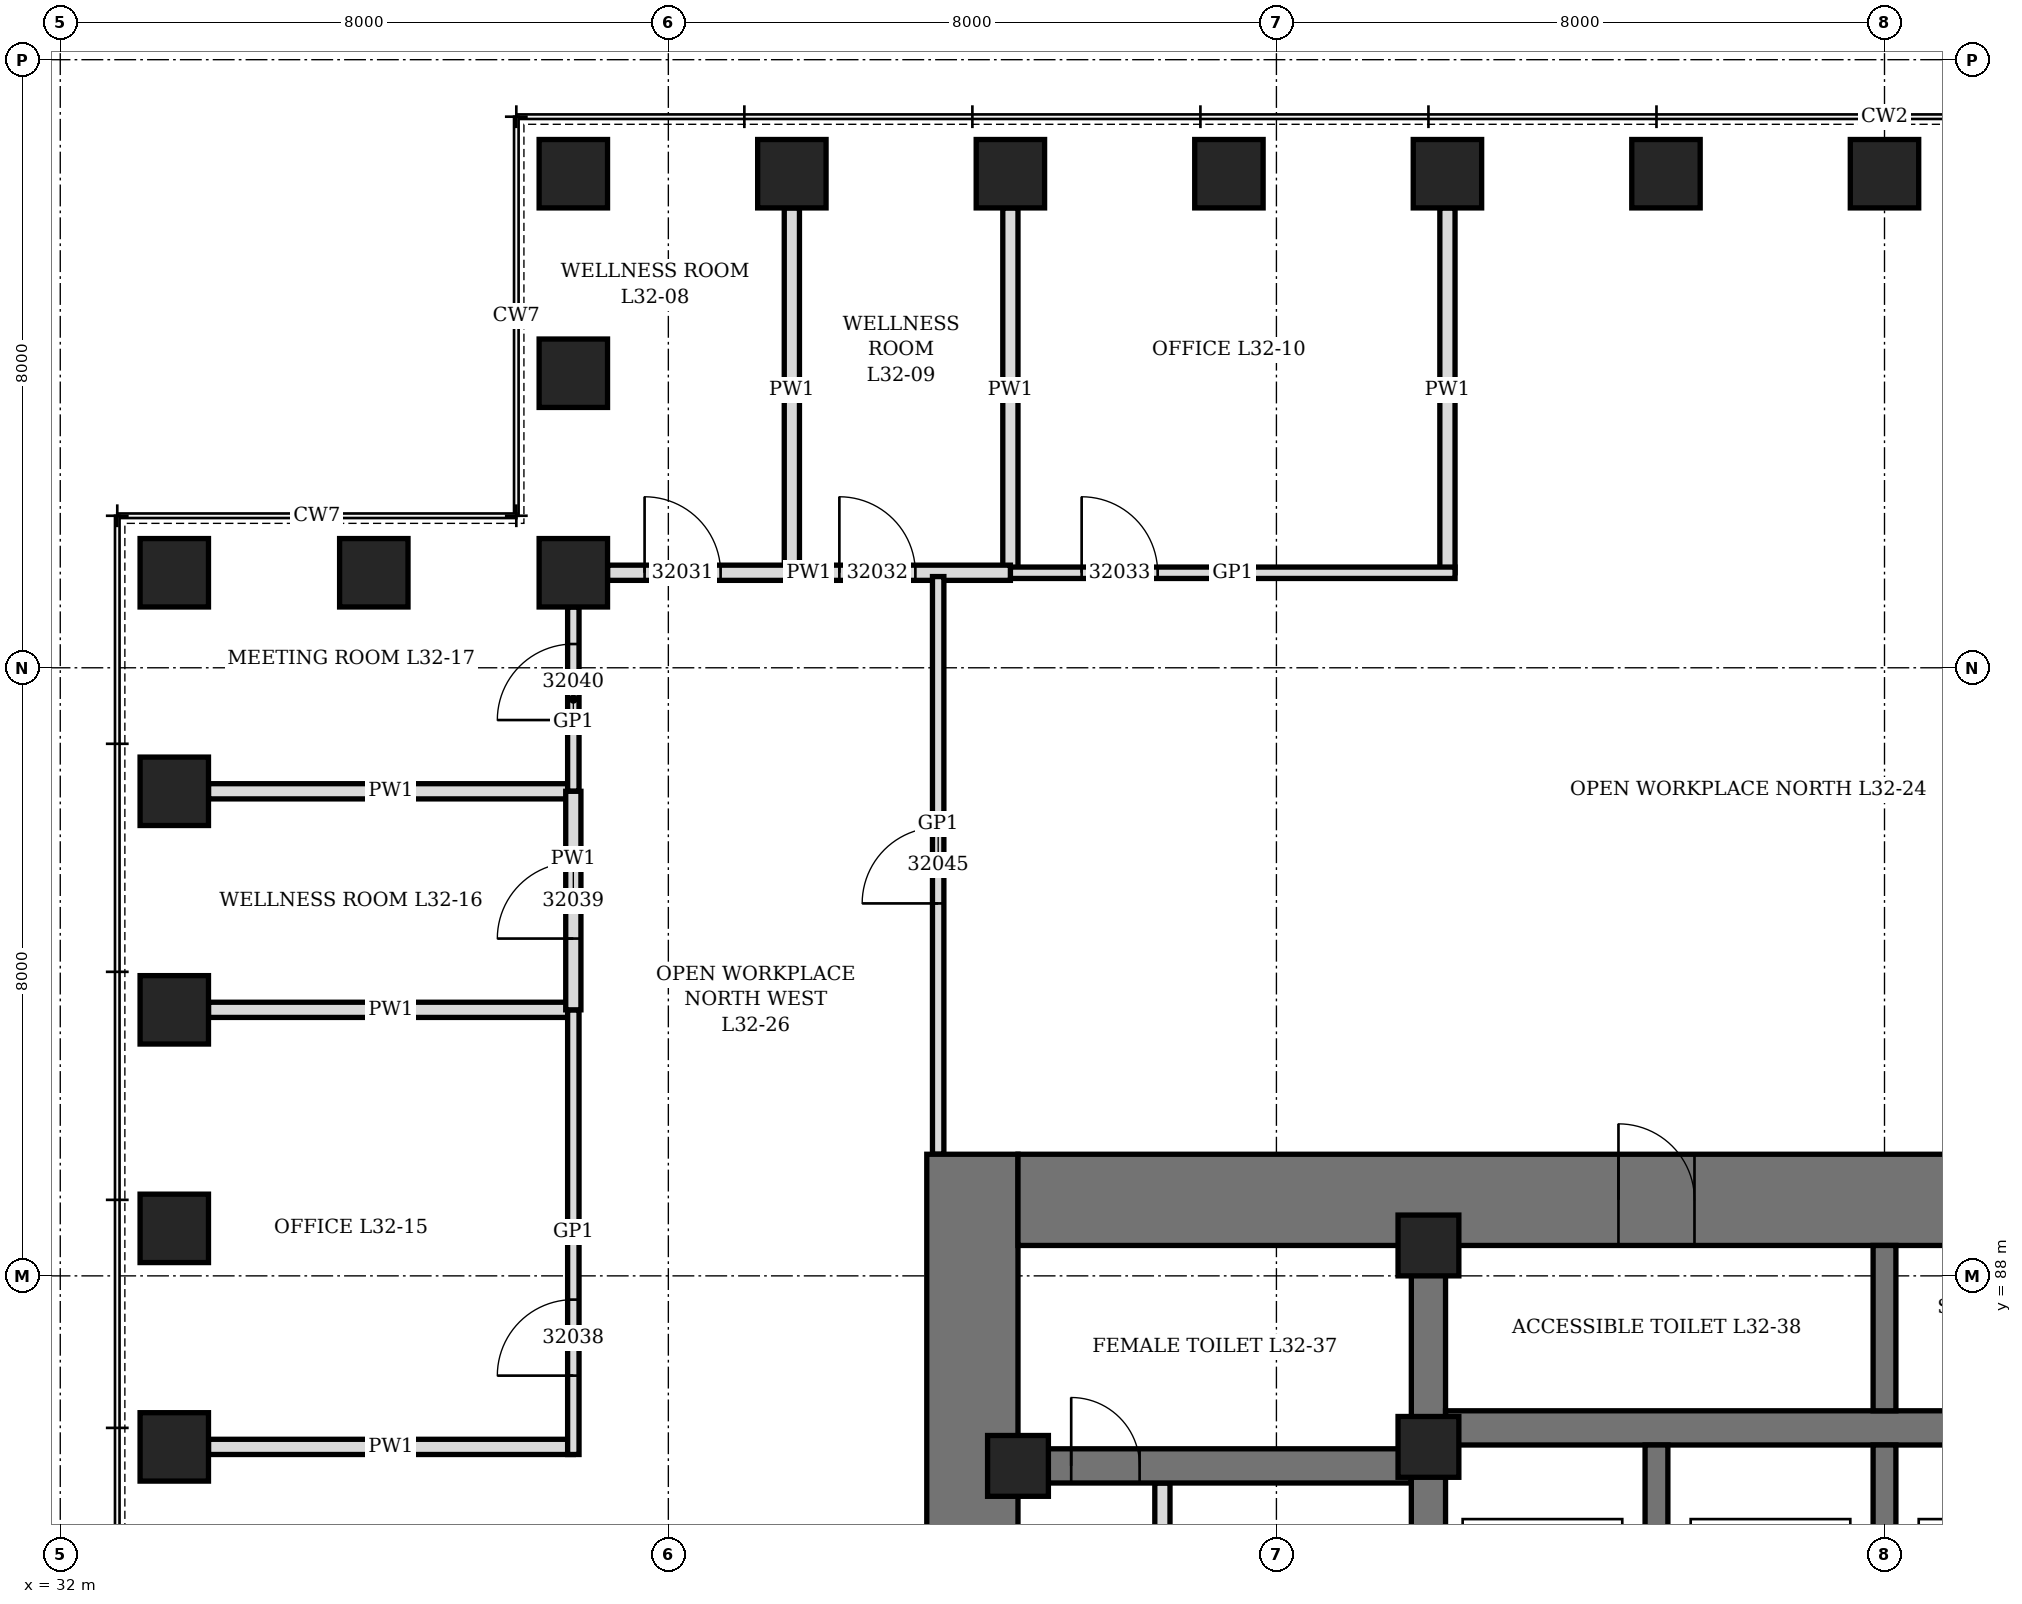
"""IFC4 building model, lengths in metres.
Left out: names, types, materials, properties, quantities, classifications, styles, units other than length and angle.
Written with IfcOpenShell. Run it as: python <this file> out.ifc"""

import sys

from ifc_helpers import new_model, si_unit, direction, frame, frame_2d, origin, origin_2d, place, context, subcontext, project, spatial, rectangle, hollow_rectangle, extrude, element, fill, save


model = new_model("IFC4")
c1 = context("Model", 3, precision=1e-05, world=origin(), true_north=direction((0.0, 1.0)))
c2 = subcontext(c1, "Body", "Model", "MODEL_VIEW")
j1 = project(units=[si_unit("LENGTHUNIT", "METRE"), si_unit("PLANEANGLEUNIT", "RADIAN")], contexts=[c1])
p1 = place(None, origin())
s1 = spatial("IfcSite", under=j1, at=p1, CompositionType="ELEMENT")
p2 = place(p1, origin())
s2 = spatial("IfcBuilding", under=s1, at=p2, CompositionType="ELEMENT")
p3 = place(p2, frame((0.0, 0.0, 145.9)))
s3 = spatial("IfcBuildingStorey", under=s2, at=p3, CompositionType="ELEMENT", Elevation=145.9)
for number, where, z_axis, x_axis in (
    (1, (56.0, 102.5, 0.0), (0.0, 0.0, 1.0), (1.0, 0.0, 0.0)),
    (2, (53.125, 102.5, 0.0), (0.0, 0.0, 1.0), (1.0, 0.0, 0.0)),
    (3, (50.25, 102.5, 0.0), (0.0, 0.0, 1.0), (1.0, 0.0, 0.0)),
    (4, (47.375, 102.5, 0.0), (0.0, 0.0, 1.0), (1.0, 0.0, 0.0)),
    (5, (44.5, 102.5, 0.0), (0.0, 0.0, 1.0), (1.0, 0.0, 0.0)),
    (6, (41.625, 102.5, 0.0), (0.0, 0.0, 1.0), (1.0, 0.0, 0.0)),
    (7, (38.75, 102.5, 0.0), (0.0, 0.0, 1.0), (0.0, 1.0, 0.0)),
    (8, (38.75, 99.875, 0.0), (0.0, 0.0, 1.0), (0.0, 1.0, 0.0)),
    (9, (38.75, 97.25, 0.0), (0.0, 0.0, 1.0), (1.0, 0.0, 0.0)),
    (10, (36.125, 97.25, 0.0), (0.0, 0.0, 1.0), (1.0, 0.0, 0.0)),
    (11, (33.5, 97.25, 0.0), (0.0, 0.0, 1.0), (0.0, 1.0, 0.0)),
    (12, (33.5, 94.375, 0.0), (0.0, 0.0, 1.0), (0.0, 1.0, 0.0)),
    (13, (33.5, 91.5, 0.0), (0.0, 0.0, 1.0), (0.0, 1.0, 0.0)),
    (14, (33.5, 88.625, 0.0), (0.0, 0.0, 1.0), (0.0, 1.0, 0.0)),
    (15, (33.5, 85.75, 0.0), (0.0, 0.0, 1.0), (0.0, 1.0, 0.0)),
):
    element("IfcColumn", number, at=place(p3, frame(where, z_axis=z_axis, x_axis=x_axis)), inside=s3, PredefinedType="COLUMN", context=c2, shape_type="SweptSolid", body=[
        extrude(hollow_rectangle(XDim=0.9, YDim=0.9, WallThickness=0.12, at=origin_2d()), origin(), (0.0, 0.0, 1.0), 4.2),
    ])
p4 = place(p3, frame((44.0, 70.4, 0.0), z_axis=(0.0, 0.0, 1.0), x_axis=(0.0, 1.0, 0.0)))
e16 = element("IfcWall", 16, at=p4, inside=s3, PredefinedType="SHEAR", context=c2, shape_type="SweptSolid", body=[
    extrude(rectangle(XDim=19.2, YDim=1.2, at=frame_2d((9.6, 0.0))), origin(), (0.0, 0.0, 1.0), 4.2),
])
p5 = place(p4, frame((8.6, 0.0, 0.0)))
e17 = element("IfcOpeningElement", 17, at=p5, cuts=e16, PredefinedType="OPENING", context=c2, shape_type="SweptSolid", body=[
    extrude(rectangle(XDim=2.0, YDim=2.4, at=frame_2d((1.0, 1.2))), frame((0.0, 0.61, 0.0), z_axis=(0.0, -1.0, 0.0), x_axis=(1.0, 0.0, 0.0)), (0.0, 0.0, 1.0), 1.22),
])
p6 = place(p3, frame((44.6, 89.0, 0.0), z_axis=(0.0, 0.0, 1.0), x_axis=(1.0, 0.0, 0.0)))
e18 = element("IfcWall", 18, at=p6, inside=s3, PredefinedType="SHEAR", context=c2, shape_type="SweptSolid", body=[
    extrude(rectangle(XDim=22.8, YDim=1.2, at=frame_2d((11.4, 0.0))), origin(), (0.0, 0.0, 1.0), 4.2),
])
p7 = place(p6, frame((7.9, 0.0, 0.0)))
e19 = element("IfcOpeningElement", 19, at=p7, cuts=e18, PredefinedType="OPENING", context=c2, shape_type="SweptSolid", body=[
    extrude(rectangle(XDim=1.0, YDim=2.1, at=frame_2d((0.5, 1.05))), frame((0.0, 0.61, 0.0), z_axis=(0.0, -1.0, 0.0), x_axis=(1.0, 0.0, 0.0)), (0.0, 0.0, 1.0), 1.22),
])
p8 = place(p6, frame((13.012, 0.0, 0.0)))
e20 = element("IfcOpeningElement", 20, at=p8, cuts=e18, PredefinedType="OPENING", context=c2, shape_type="SweptSolid", body=[
    extrude(rectangle(XDim=0.9, YDim=2.1, at=frame_2d((0.45, 1.05))), frame((0.0, 0.61, 0.0), z_axis=(0.0, -1.0, 0.0), x_axis=(1.0, 0.0, 0.0)), (0.0, 0.0, 1.0), 1.22),
])
p9 = place(p3, frame((50.0, 71.6, 0.0), z_axis=(0.0, 0.0, 1.0), x_axis=(0.0, 1.0, 0.0)))
e21 = element("IfcWall", 21, at=p9, inside=s3, PredefinedType="SHEAR", context=c2, shape_type="SweptSolid", body=[
    extrude(rectangle(XDim=16.8, YDim=0.45, at=frame_2d((8.4, 0.0))), origin(), (0.0, 0.0, 1.0), 4.2),
])
p10 = place(p9, frame((7.5, 0.0, 0.0)))
e22 = element("IfcOpeningElement", 22, at=p10, cuts=e21, PredefinedType="OPENING", context=c2, shape_type="SweptSolid", body=[
    extrude(rectangle(XDim=1.8, YDim=2.4, at=frame_2d((0.9, 1.2))), frame((0.0, 0.235, 0.0), z_axis=(0.0, -1.0, 0.0), x_axis=(1.0, 0.0, 0.0)), (0.0, 0.0, 1.0), 0.47),
])
p11 = place(p3, frame((44.6, 85.5, 0.0), z_axis=(0.0, 0.0, 1.0), x_axis=(1.0, 0.0, 0.0)))
e23 = element("IfcWall", 23, at=p11, inside=s3, PredefinedType="SHEAR", context=c2, shape_type="SweptSolid", body=[
    extrude(rectangle(XDim=5.175, YDim=0.45, at=frame_2d((2.587, 0.0))), origin(), (0.0, 0.0, 1.0), 4.2),
])
p12 = place(p11, frame((0.7, 0.0, 0.0)))
e24 = element("IfcOpeningElement", 24, at=p12, cuts=e23, PredefinedType="OPENING", context=c2, shape_type="SweptSolid", body=[
    extrude(rectangle(XDim=0.9, YDim=2.1, at=frame_2d((0.45, 1.05))), frame((0.0, 0.235, 0.0), z_axis=(0.0, -1.0, 0.0), x_axis=(1.0, 0.0, 0.0)), (0.0, 0.0, 1.0), 0.47),
])
p13 = place(p3, frame((50.225, 86.0, 0.0), z_axis=(0.0, 0.0, 1.0), x_axis=(1.0, 0.0, 0.0)))
e25 = element("IfcWall", 25, at=p13, inside=s3, PredefinedType="SHEAR", context=c2, shape_type="SweptSolid", body=[
    extrude(rectangle(XDim=11.55, YDim=0.45, at=frame_2d((5.775, 0.0))), origin(), (0.0, 0.0, 1.0), 4.2),
])
for number, where, z_axis, x_axis in (
    (26, (53.0, 82.225, 0.0), (0.0, 0.0, 1.0), (0.0, 1.0, 0.0)),
    (27, (56.0, 82.225, 0.0), (0.0, 0.0, 1.0), (0.0, 1.0, 0.0)),
):
    element("IfcWall", number, at=place(p3, frame(where, z_axis=z_axis, x_axis=x_axis)), inside=s3, PredefinedType="SHEAR", context=c2, shape_type="SweptSolid", body=[
        extrude(rectangle(XDim=3.55, YDim=0.3, at=frame_2d((1.775, 0.0))), origin(), (0.0, 0.0, 1.0), 4.2),
    ])
p14 = place(p3, frame((56.0, 86.225, 0.0), z_axis=(0.0, 0.0, 1.0), x_axis=(0.0, 1.0, 0.0)))
e28 = element("IfcWall", 28, at=p14, inside=s3, PredefinedType="SHEAR", context=c2, shape_type="SweptSolid", body=[
    extrude(rectangle(XDim=2.175, YDim=0.3, at=frame_2d((1.087, 0.0))), origin(), (0.0, 0.0, 1.0), 4.2),
])
for number, where, z_axis, x_axis in (
    (29, (44.6, 85.5, 0.0), (0.0, 0.0, 1.0), (1.0, 0.0, 0.0)),
    (30, (50.0, 85.75, 0.0), (0.0, 0.0, 1.0), (1.0, 0.0, 0.0)),
    (31, (50.0, 88.4, 0.0), (0.0, 0.0, 1.0), (1.0, 0.0, 0.0)),
):
    element("IfcColumn", number, at=place(p3, frame(where, z_axis=z_axis, x_axis=x_axis)), inside=s3, PredefinedType="COLUMN", context=c2, shape_type="SweptSolid", body=[
        extrude(hollow_rectangle(XDim=0.8, YDim=0.8, WallThickness=0.1, at=origin_2d()), origin(), (0.0, 0.0, 1.0), 4.2),
    ])
p15 = place(p3, frame((46.5, 82.225, 0.0), z_axis=(0.0, 0.0, 1.0), x_axis=(0.0, 1.0, 0.0)))
e32 = element("IfcWall", 32, at=p15, inside=s3, PredefinedType="PARTITIONING", context=c2, shape_type="SweptSolid", body=[
    extrude(rectangle(XDim=3.05, YDim=0.2, at=frame_2d((1.525, 0.0))), origin(), (0.0, 0.0, 1.0), 4.04),
])
p16 = place(p15, frame((1.075, 0.0, 0.0)))
e33 = element("IfcOpeningElement", 33, at=p16, cuts=e32, PredefinedType="OPENING", context=c2, shape_type="SweptSolid", body=[
    extrude(rectangle(XDim=0.9, YDim=2.1, at=frame_2d((0.45, 1.05))), frame((0.0, 0.11, 0.0), z_axis=(0.0, -1.0, 0.0), x_axis=(1.0, 0.0, 0.0)), (0.0, 0.0, 1.0), 0.22),
])
p17 = place(p3, frame((41.625, 97.25, 0.0), z_axis=(0.0, 0.0, 1.0), x_axis=(0.0, 1.0, 0.0)))
e34 = element("IfcWall", 34, at=p17, inside=s3, PredefinedType="PARTITIONING", context=c2, shape_type="SweptSolid", body=[
    extrude(rectangle(XDim=4.8, YDim=0.2, at=frame_2d((2.4, 0.0))), origin(), (0.0, 0.0, 1.0), 3.428),
])
p18 = place(p3, frame((44.5, 97.25, 0.0), z_axis=(0.0, 0.0, 1.0), x_axis=(0.0, 1.0, 0.0)))
e35 = element("IfcWall", 35, at=p18, inside=s3, PredefinedType="PARTITIONING", context=c2, shape_type="SweptSolid", body=[
    extrude(rectangle(XDim=4.8, YDim=0.2, at=frame_2d((2.4, 0.0))), origin(), (0.0, 0.0, 1.0), 2.74),
])
p19 = place(p3, frame((50.25, 97.25, 0.0), z_axis=(0.0, 0.0, 1.0), x_axis=(0.0, 1.0, 0.0)))
e36 = element("IfcWall", 36, at=p19, inside=s3, PredefinedType="PARTITIONING", context=c2, shape_type="SweptSolid", body=[
    extrude(rectangle(XDim=4.8, YDim=0.2, at=frame_2d((2.4, 0.0))), origin(), (0.0, 0.0, 1.0), 3.278),
])
for number, where, z_axis, x_axis in (
    (37, (33.95, 85.75, 0.0), (0.0, 0.0, 1.0), (1.0, 0.0, 0.0)),
    (38, (33.95, 91.5, 0.0), (0.0, 0.0, 1.0), (1.0, 0.0, 0.0)),
    (39, (33.95, 94.375, 0.0), (0.0, 0.0, 1.0), (1.0, 0.0, 0.0)),
):
    element("IfcWall", number, at=place(p3, frame(where, z_axis=z_axis, x_axis=x_axis)), inside=s3, PredefinedType="PARTITIONING", context=c2, shape_type="SweptSolid", body=[
        extrude(rectangle(XDim=4.8, YDim=0.2, at=frame_2d((2.4, 0.0))), origin(), (0.0, 0.0, 1.0), 3.428),
    ])
p20 = place(p3, frame((44.5, 97.25, 0.0), z_axis=(0.0, 0.0, 1.0), x_axis=(1.0, 0.0, 0.0)))
e40 = element("IfcWall", 40, at=p20, inside=s3, PredefinedType="PARTITIONING", context=c2, shape_type="SweptSolid", body=[
    extrude(rectangle(XDim=5.85, YDim=0.15, at=frame_2d((2.925, 0.0))), origin(), (0.0, 0.0, 1.0), 4.04),
])
p21 = place(p20, frame((0.938, 0.0, 0.0)))
e41 = element("IfcOpeningElement", 41, at=p21, cuts=e40, PredefinedType="OPENING", context=c2, shape_type="SweptSolid", body=[
    extrude(rectangle(XDim=1.0, YDim=2.1, at=frame_2d((0.5, 1.05))), frame((0.0, 0.085, 0.0), z_axis=(0.0, -1.0, 0.0), x_axis=(1.0, 0.0, 0.0)), (0.0, 0.0, 1.0), 0.17),
])
p22 = place(p3, frame((39.2, 97.25, 0.0), z_axis=(0.0, 0.0, 1.0), x_axis=(1.0, 0.0, 0.0)))
e42 = element("IfcWall", 42, at=p22, inside=s3, PredefinedType="PARTITIONING", context=c2, shape_type="SweptSolid", body=[
    extrude(rectangle(XDim=5.3, YDim=0.2, at=frame_2d((2.65, 0.0))), origin(), (0.0, 0.0, 1.0), 4.04),
])
p23 = place(p22, frame((0.488, 0.0, 0.0)))
e43 = element("IfcOpeningElement", 43, at=p23, cuts=e42, PredefinedType="OPENING", context=c2, shape_type="SweptSolid", body=[
    extrude(rectangle(XDim=1.0, YDim=2.1, at=frame_2d((0.5, 1.05))), frame((0.0, 0.11, 0.0), z_axis=(0.0, -1.0, 0.0), x_axis=(1.0, 0.0, 0.0)), (0.0, 0.0, 1.0), 0.22),
])
p24 = place(p22, frame((3.05, 0.0, 0.0)))
e44 = element("IfcOpeningElement", 44, at=p24, cuts=e42, PredefinedType="OPENING", context=c2, shape_type="SweptSolid", body=[
    extrude(rectangle(XDim=1.0, YDim=2.1, at=frame_2d((0.5, 1.05))), frame((0.0, 0.11, 0.0), z_axis=(0.0, -1.0, 0.0), x_axis=(1.0, 0.0, 0.0)), (0.0, 0.0, 1.0), 0.22),
])
p25 = place(p3, frame((38.75, 85.65, 0.0), z_axis=(0.0, 0.0, 1.0), x_axis=(0.0, 1.0, 0.0)))
e45 = element("IfcWall", 45, at=p25, inside=s3, PredefinedType="PARTITIONING", context=c2, shape_type="SweptSolid", body=[
    extrude(rectangle(XDim=5.85, YDim=0.15, at=frame_2d((2.925, 0.0))), origin(), (0.0, 0.0, 1.0), 4.04),
])
p26 = place(p25, frame((1.038, 0.0, 0.0)))
e46 = element("IfcOpeningElement", 46, at=p26, cuts=e45, PredefinedType="OPENING", context=c2, shape_type="SweptSolid", body=[
    extrude(rectangle(XDim=1.0, YDim=2.1, at=frame_2d((0.5, 1.05))), frame((0.0, 0.085, 0.0), z_axis=(0.0, -1.0, 0.0), x_axis=(1.0, 0.0, 0.0)), (0.0, 0.0, 1.0), 0.17),
])
p27 = place(p3, frame((38.75, 94.375, 0.0), z_axis=(0.0, 0.0, 1.0), x_axis=(0.0, 1.0, 0.0)))
e47 = element("IfcWall", 47, at=p27, inside=s3, PredefinedType="PARTITIONING", context=c2, shape_type="SweptSolid", body=[
    extrude(rectangle(XDim=2.425, YDim=0.15, at=frame_2d((1.212, 0.0))), origin(), (0.0, 0.0, 1.0), 4.04),
])
p28 = place(p27, frame((0.938, 0.0, 0.0)))
e48 = element("IfcOpeningElement", 48, at=p28, cuts=e47, PredefinedType="OPENING", context=c2, shape_type="SweptSolid", body=[
    extrude(rectangle(XDim=1.0, YDim=2.4, at=frame_2d((0.5, 1.2))), frame((0.0, 0.085, 0.0), z_axis=(0.0, -1.0, 0.0), x_axis=(1.0, 0.0, 0.0)), (0.0, 0.0, 1.0), 0.17),
])
p29 = place(p3, frame((38.75, 91.5, 0.0), z_axis=(0.0, 0.0, 1.0), x_axis=(0.0, 1.0, 0.0)))
e49 = element("IfcWall", 49, at=p29, inside=s3, PredefinedType="PARTITIONING", context=c2, shape_type="SweptSolid", body=[
    extrude(rectangle(XDim=2.875, YDim=0.2, at=frame_2d((1.438, 0.0))), origin(), (0.0, 0.0, 1.0), 4.04),
])
p30 = place(p29, frame((0.938, 0.0, 0.0)))
e50 = element("IfcOpeningElement", 50, at=p30, cuts=e49, PredefinedType="OPENING", context=c2, shape_type="SweptSolid", body=[
    extrude(rectangle(XDim=1.0, YDim=2.1, at=frame_2d((0.5, 1.05))), frame((0.0, 0.11, 0.0), z_axis=(0.0, -1.0, 0.0), x_axis=(1.0, 0.0, 0.0)), (0.0, 0.0, 1.0), 0.22),
])
p31 = place(p3, frame((43.55, 89.6, 0.0), z_axis=(0.0, 0.0, 1.0), x_axis=(0.0, 1.0, 0.0)))
e51 = element("IfcWall", 51, at=p31, inside=s3, PredefinedType="PARTITIONING", context=c2, shape_type="SweptSolid", body=[
    extrude(rectangle(XDim=7.6, YDim=0.15, at=frame_2d((3.8, 0.0))), origin(), (0.0, 0.0, 1.0), 4.04),
])
p32 = place(p31, frame((3.3, 0.0, 0.0)))
e52 = element("IfcOpeningElement", 52, at=p32, cuts=e51, PredefinedType="OPENING", context=c2, shape_type="SweptSolid", body=[
    extrude(rectangle(XDim=1.0, YDim=2.4, at=frame_2d((0.5, 1.2))), frame((0.0, 0.085, 0.0), z_axis=(0.0, -1.0, 0.0), x_axis=(1.0, 0.0, 0.0)), (0.0, 0.0, 1.0), 0.17),
])
p33 = place(p12, origin())
e53 = element("IfcDoor", 53, at=p33, inside=s3, OperationType="SINGLE_SWING_RIGHT", PredefinedType="DOOR", context=c2, shape_type="SweptSolid", body=[
    extrude(rectangle(XDim=0.9, YDim=2.1, at=frame_2d((0.45, 1.05))), frame((0.0, 0.225, 0.0), z_axis=(0.0, -1.0, 0.0), x_axis=(1.0, 0.0, 0.0)), (0.0, 0.0, 1.0), 0.449),
])
fill(e24, e53)
p34 = place(p7, origin())
e54 = element("IfcDoor", 54, at=p34, inside=s3, OperationType="SINGLE_SWING_LEFT", PredefinedType="DOOR", context=c2, shape_type="SweptSolid", body=[
    extrude(rectangle(XDim=1.0, YDim=2.1, at=frame_2d((0.5, 1.05))), frame((0.0, 0.35, 0.0), z_axis=(0.0, -1.0, 0.0), x_axis=(1.0, 0.0, 0.0)), (0.0, 0.0, 1.0), 0.7),
])
fill(e19, e54)
p35 = place(p23, origin())
e55 = element("IfcDoor", 55, at=p35, inside=s3, OperationType="SINGLE_SWING_LEFT", PredefinedType="DOOR", context=c2, shape_type="SweptSolid", body=[
    extrude(rectangle(XDim=1.0, YDim=2.1, at=frame_2d((0.5, 1.05))), frame((0.0, 0.1, 0.0), z_axis=(0.0, -1.0, 0.0), x_axis=(1.0, 0.0, 0.0)), (0.0, 0.0, 1.0), 0.199),
])
fill(e43, e55)
p36 = place(p24, origin())
e56 = element("IfcDoor", 56, at=p36, inside=s3, OperationType="SINGLE_SWING_LEFT", PredefinedType="DOOR", context=c2, shape_type="SweptSolid", body=[
    extrude(rectangle(XDim=1.0, YDim=2.1, at=frame_2d((0.5, 1.05))), frame((0.0, 0.1, 0.0), z_axis=(0.0, -1.0, 0.0), x_axis=(1.0, 0.0, 0.0)), (0.0, 0.0, 1.0), 0.199),
])
fill(e44, e56)
p37 = place(p21, origin())
e57 = element("IfcDoor", 57, at=p37, inside=s3, OperationType="SINGLE_SWING_LEFT", PredefinedType="DOOR", context=c2, shape_type="SweptSolid", body=[
    extrude(rectangle(XDim=1.0, YDim=2.1, at=frame_2d((0.5, 1.05))), frame((0.0, 0.075, 0.0), z_axis=(0.0, -1.0, 0.0), x_axis=(1.0, 0.0, 0.0)), (0.0, 0.0, 1.0), 0.149),
])
fill(e41, e57)
p38 = place(p26, origin())
e58 = element("IfcDoor", 58, at=p38, inside=s3, OperationType="SINGLE_SWING_LEFT", PredefinedType="DOOR", context=c2, shape_type="SweptSolid", body=[
    extrude(rectangle(XDim=1.0, YDim=2.1, at=frame_2d((0.5, 1.05))), frame((0.0, 0.075, 0.0), z_axis=(0.0, -1.0, 0.0), x_axis=(1.0, 0.0, 0.0)), (0.0, 0.0, 1.0), 0.149),
])
fill(e46, e58)
p39 = place(p30, origin())
e59 = element("IfcDoor", 59, at=p39, inside=s3, OperationType="SINGLE_SWING_LEFT", PredefinedType="DOOR", context=c2, shape_type="SweptSolid", body=[
    extrude(rectangle(XDim=1.0, YDim=2.1, at=frame_2d((0.5, 1.05))), frame((0.0, 0.1, 0.0), z_axis=(0.0, -1.0, 0.0), x_axis=(1.0, 0.0, 0.0)), (0.0, 0.0, 1.0), 0.199),
])
fill(e50, e59)
p40 = place(p28, origin())
e60 = element("IfcDoor", 60, at=p40, inside=s3, OperationType="SINGLE_SWING_RIGHT", PredefinedType="DOOR", context=c2, shape_type="SweptSolid", body=[
    extrude(rectangle(XDim=1.0, YDim=2.4, at=frame_2d((0.5, 1.2))), frame((0.0, 0.075, 0.0), z_axis=(0.0, -1.0, 0.0), x_axis=(1.0, 0.0, 0.0)), (0.0, 0.0, 1.0), 0.149),
])
fill(e48, e60)
p41 = place(p32, origin())
e61 = element("IfcDoor", 61, at=p41, inside=s3, OperationType="SINGLE_SWING_RIGHT", PredefinedType="DOOR", context=c2, shape_type="SweptSolid", body=[
    extrude(rectangle(XDim=1.0, YDim=2.4, at=frame_2d((0.5, 1.2))), frame((0.0, 0.075, 0.0), z_axis=(0.0, -1.0, 0.0), x_axis=(1.0, 0.0, 0.0)), (0.0, 0.0, 1.0), 0.149),
])
fill(e52, e61)
save(model, sys.argv[1])
